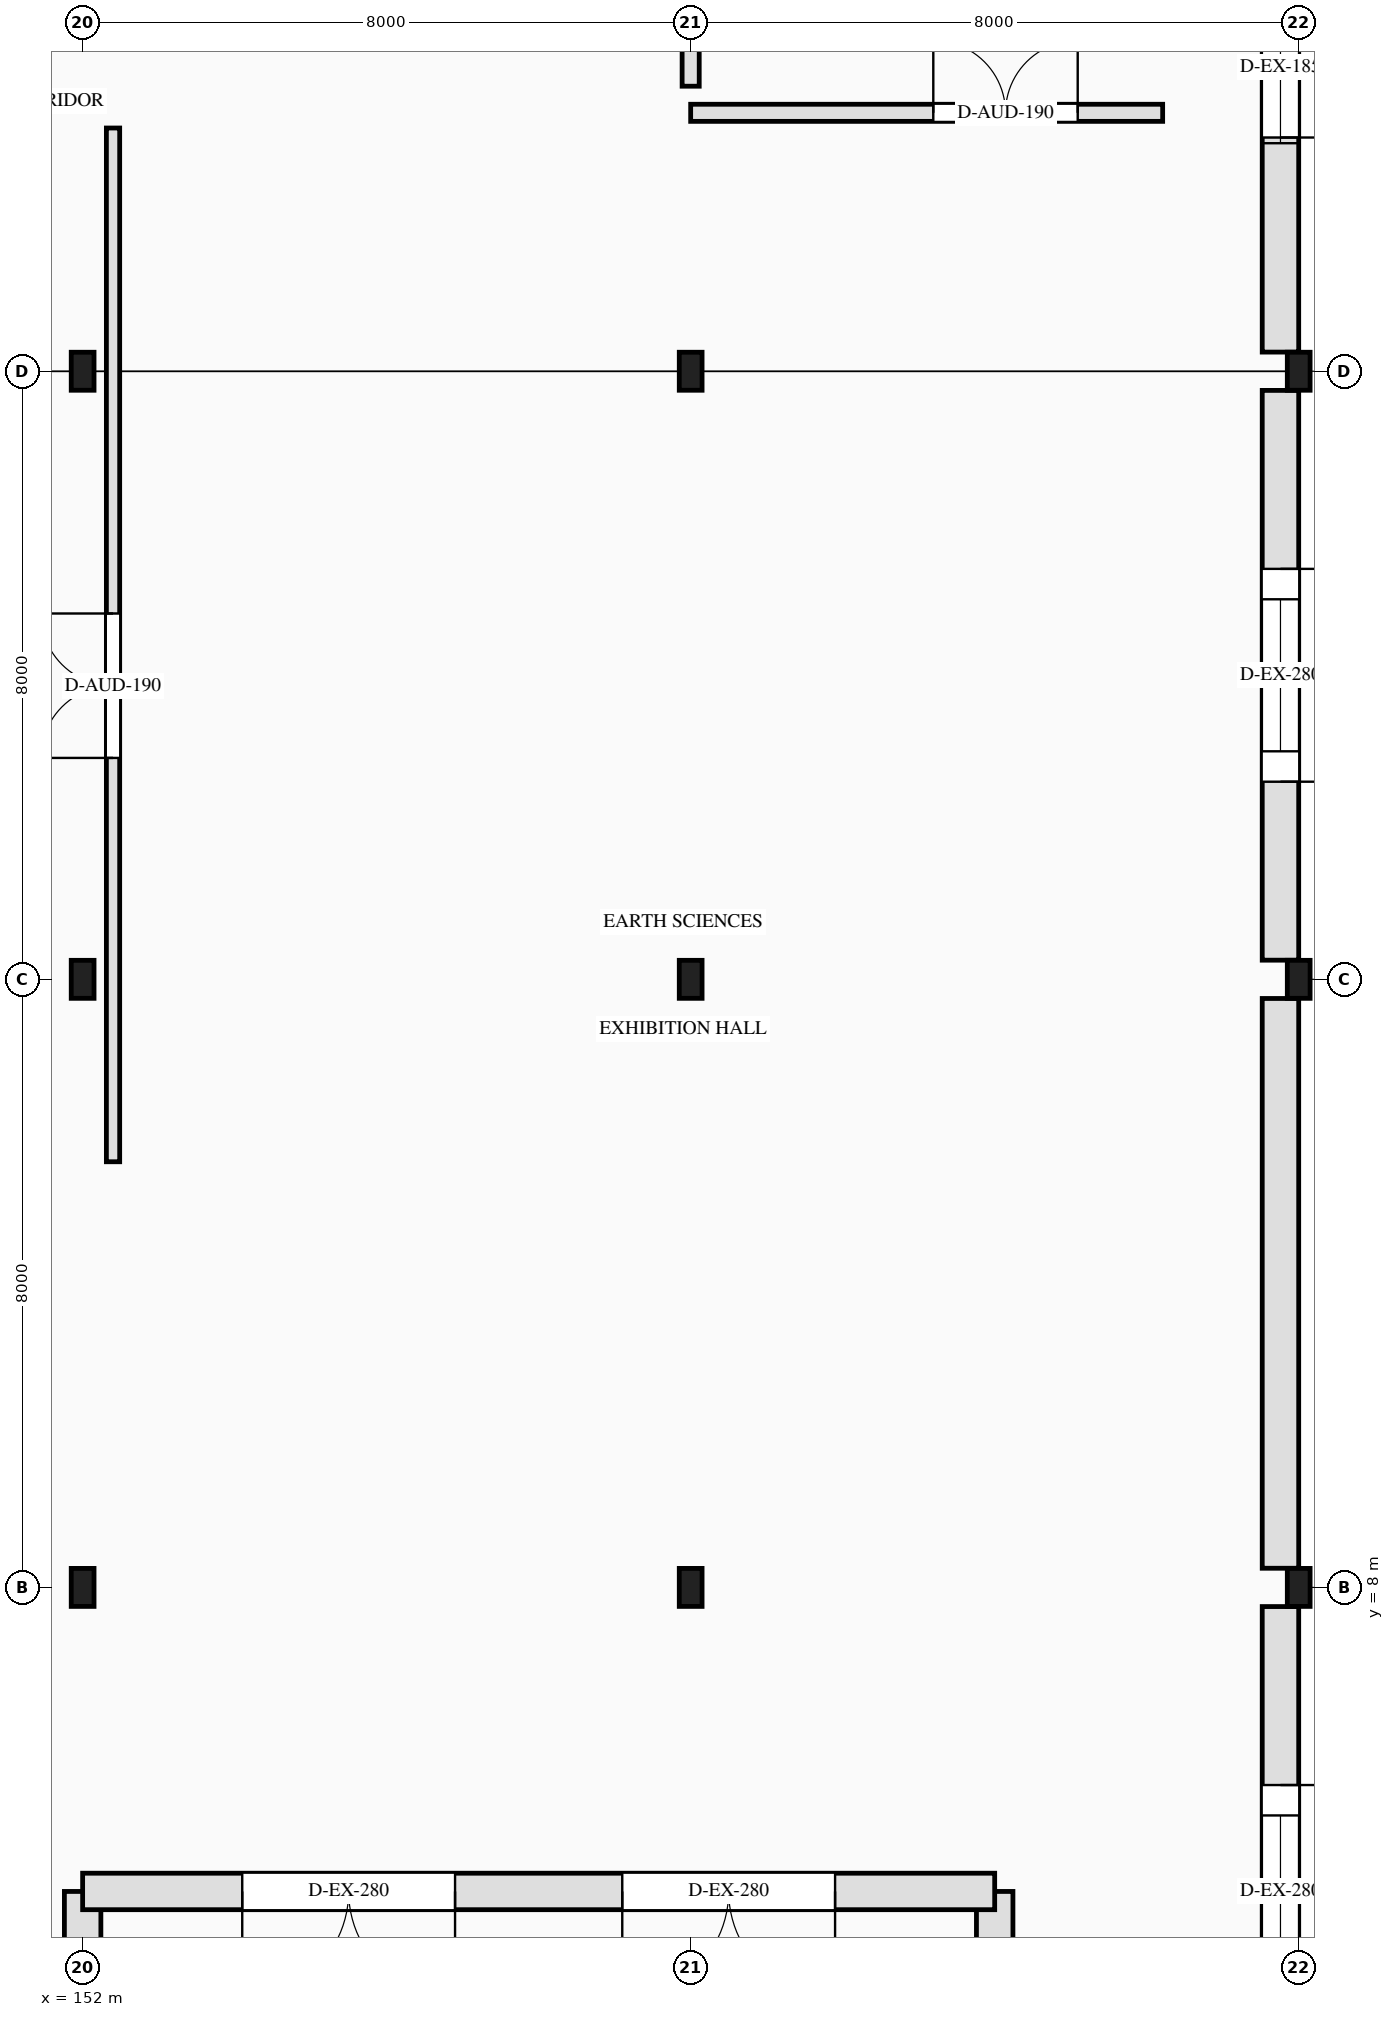
"""IFC4 building model, lengths in metres.
Left out: names, types, materials, properties, quantities, classifications, styles, units other than length and angle.
Written with IfcOpenShell. Run it as: python <this file> out.ifc"""

import sys

from ifc_helpers import new_model, si_unit, direction, frame, frame_2d, origin, origin_2d, place, context, subcontext, project, spatial, rectangle, i_section, extrude, element, fill, save


model = new_model("IFC4")
c1 = context("Model", 3, precision=1e-05, world=origin(), true_north=direction((0.0, 1.0)))
c2 = subcontext(c1, "Body", "Model", "MODEL_VIEW")
j1 = project(units=[si_unit("LENGTHUNIT", "METRE"), si_unit("PLANEANGLEUNIT", "RADIAN")], contexts=[c1])
p1 = place(None, origin())
s1 = spatial("IfcSite", under=j1, at=p1, CompositionType="ELEMENT")
p2 = place(p1, origin())
s2 = spatial("IfcBuilding", under=s1, at=p2, CompositionType="ELEMENT")
p3 = place(p2, origin())
s3 = spatial("IfcBuildingStorey", under=s2, at=p3, CompositionType="ELEMENT", Elevation=0.0)
for number, where, z_axis, x_axis in (
    (1, (152.0, 8.0, 0.0), (0.0, 0.0, 1.0), (1.0, 0.0, 0.0)),
    (2, (152.0, 16.0, 0.0), (0.0, 0.0, 1.0), (1.0, 0.0, 0.0)),
    (3, (152.0, 24.0, 0.0), (0.0, 0.0, 1.0), (1.0, 0.0, 0.0)),
    (4, (160.0, 8.0, 0.0), (0.0, 0.0, 1.0), (1.0, 0.0, 0.0)),
    (5, (160.0, 16.0, 0.0), (0.0, 0.0, 1.0), (1.0, 0.0, 0.0)),
    (6, (160.0, 24.0, 0.0), (0.0, 0.0, 1.0), (1.0, 0.0, 0.0)),
    (7, (168.0, 8.0, 0.0), (0.0, 0.0, 1.0), (1.0, 0.0, 0.0)),
    (8, (168.0, 16.0, 0.0), (0.0, 0.0, 1.0), (1.0, 0.0, 0.0)),
    (9, (168.0, 24.0, 0.0), (0.0, 0.0, 1.0), (1.0, 0.0, 0.0)),
):
    element("IfcColumn", number, at=place(p3, frame(where, z_axis=z_axis, x_axis=x_axis)), inside=s3, PredefinedType="COLUMN", context=c2, shape_type="SweptSolid", body=[
        extrude(i_section(OverallWidth=0.3, OverallDepth=0.5, WebThickness=0.014, FlangeThickness=0.028, FilletRadius=0.027, at=origin_2d()), origin(), (0.0, 0.0, 1.0), 5.4),
    ])
p4 = place(p3, frame((152.0, 0.24, 0.0), z_axis=(0.0, 0.0, 1.0), x_axis=(0.0, 1.0, 0.0)))
e10 = element("IfcWall", 10, at=p4, inside=s3, PredefinedType="SOLIDWALL", context=c2, shape_type="SweptSolid", body=[
    extrude(rectangle(XDim=3.76, YDim=0.48, at=frame_2d((1.88, 0.0))), origin(), (0.0, 0.0, 1.0), 3.84),
])
p5 = place(p4, frame((1.0, 0.0, 0.9)))
e11 = element("IfcOpeningElement", 11, at=p5, cuts=e10, PredefinedType="OPENING", context=c2, shape_type="SweptSolid", body=[
    extrude(rectangle(XDim=1.55, YDim=2.7, at=frame_2d((0.775, 1.35))), frame((0.0, 0.25, 0.0), z_axis=(0.0, -1.0, 0.0), x_axis=(1.0, 0.0, 0.0)), (0.0, 0.0, 1.0), 0.5),
])
p6 = place(p3, frame((164.0, 0.24, 0.0), z_axis=(0.0, 0.0, 1.0), x_axis=(0.0, 1.0, 0.0)))
e12 = element("IfcWall", 12, at=p6, inside=s3, PredefinedType="SOLIDWALL", context=c2, shape_type="SweptSolid", body=[
    extrude(rectangle(XDim=3.76, YDim=0.48, at=frame_2d((1.88, 0.0))), origin(), (0.0, 0.0, 1.0), 3.84),
])
p7 = place(p6, frame((1.0, 0.0, 0.9)))
e13 = element("IfcOpeningElement", 13, at=p7, cuts=e12, PredefinedType="OPENING", context=c2, shape_type="SweptSolid", body=[
    extrude(rectangle(XDim=1.55, YDim=2.7, at=frame_2d((0.775, 1.35))), frame((0.0, 0.25, 0.0), z_axis=(0.0, -1.0, 0.0), x_axis=(1.0, 0.0, 0.0)), (0.0, 0.0, 1.0), 0.5),
])
p8 = place(p3, frame((164.0, 4.0, 0.0), z_axis=(0.0, 0.0, 1.0), x_axis=(-1.0, 0.0, 0.0)))
e14 = element("IfcWall", 14, at=p8, inside=s3, PredefinedType="SOLIDWALL", context=c2, shape_type="SweptSolid", body=[
    extrude(rectangle(XDim=12.0, YDim=0.48, at=frame_2d((6.0, 0.0))), origin(), (0.0, 0.0, 1.0), 5.16),
])
p9 = place(p8, frame((2.1, 0.0, 0.0)))
e15 = element("IfcOpeningElement", 15, at=p9, cuts=e14, PredefinedType="OPENING", context=c2, shape_type="SweptSolid", body=[
    extrude(rectangle(XDim=2.8, YDim=3.1, at=frame_2d((1.4, 1.55))), frame((0.0, 0.25, 0.0), z_axis=(0.0, -1.0, 0.0), x_axis=(1.0, 0.0, 0.0)), (0.0, 0.0, 1.0), 0.5),
])
p10 = place(p8, frame((7.1, 0.0, 0.0)))
e16 = element("IfcOpeningElement", 16, at=p10, cuts=e14, PredefinedType="OPENING", context=c2, shape_type="SweptSolid", body=[
    extrude(rectangle(XDim=2.8, YDim=3.1, at=frame_2d((1.4, 1.55))), frame((0.0, 0.25, 0.0), z_axis=(0.0, -1.0, 0.0), x_axis=(1.0, 0.0, 0.0)), (0.0, 0.0, 1.0), 0.5),
])
p11 = place(p3, frame((167.76, 7.748, 0.0), z_axis=(0.0, 0.0, 1.0), x_axis=(0.0, -1.0, 0.0)))
e17 = element("IfcWall", 17, at=p11, inside=s3, PredefinedType="SOLIDWALL", context=c2, shape_type="SweptSolid", body=[
    extrude(rectangle(XDim=7.496, YDim=0.48, at=frame_2d((3.748, 0.0))), origin(), (0.0, 0.0, 1.0), 4.835),
])
p12 = place(p11, frame((2.348, 0.0, 0.0)))
e18 = element("IfcOpeningElement", 18, at=p12, cuts=e17, PredefinedType="OPENING", context=c2, shape_type="SweptSolid", body=[
    extrude(rectangle(XDim=2.8, YDim=3.1, at=frame_2d((1.4, 1.55))), frame((0.0, 0.25, 0.0), z_axis=(0.0, -1.0, 0.0), x_axis=(1.0, 0.0, 0.0)), (0.0, 0.0, 1.0), 0.5),
])
p13 = place(p11, frame((2.748, 0.0, 3.32)))
e19 = element("IfcOpeningElement", 19, at=p13, cuts=e17, PredefinedType="OPENING", context=c2, shape_type="SweptSolid", body=[
    extrude(rectangle(XDim=2.0, YDim=1.1, at=frame_2d((1.0, 0.55))), frame((0.0, 0.25, 0.0), z_axis=(0.0, -1.0, 0.0), x_axis=(1.0, 0.0, 0.0)), (0.0, 0.0, 1.0), 0.5),
])
p14 = place(p3, frame((167.76, 15.748, 0.0), z_axis=(0.0, 0.0, 1.0), x_axis=(0.0, -1.0, 0.0)))
e20 = element("IfcWall", 20, at=p14, inside=s3, PredefinedType="SOLIDWALL", context=c2, shape_type="SweptSolid", body=[
    extrude(rectangle(XDim=7.496, YDim=0.48, at=frame_2d((3.748, 0.0))), origin(), (0.0, 0.0, 1.0), 4.835),
])
p15 = place(p3, frame((167.76, 23.748, 0.0), z_axis=(0.0, 0.0, 1.0), x_axis=(0.0, -1.0, 0.0)))
e21 = element("IfcWall", 21, at=p15, inside=s3, PredefinedType="SOLIDWALL", context=c2, shape_type="SweptSolid", body=[
    extrude(rectangle(XDim=7.496, YDim=0.48, at=frame_2d((3.748, 0.0))), origin(), (0.0, 0.0, 1.0), 4.835),
])
p16 = place(p15, frame((2.348, 0.0, 0.0)))
e22 = element("IfcOpeningElement", 22, at=p16, cuts=e21, PredefinedType="OPENING", context=c2, shape_type="SweptSolid", body=[
    extrude(rectangle(XDim=2.8, YDim=3.1, at=frame_2d((1.4, 1.55))), frame((0.0, 0.25, 0.0), z_axis=(0.0, -1.0, 0.0), x_axis=(1.0, 0.0, 0.0)), (0.0, 0.0, 1.0), 0.5),
])
p17 = place(p15, frame((2.748, 0.0, 3.32)))
e23 = element("IfcOpeningElement", 23, at=p17, cuts=e21, PredefinedType="OPENING", context=c2, shape_type="SweptSolid", body=[
    extrude(rectangle(XDim=2.0, YDim=1.1, at=frame_2d((1.0, 0.55))), frame((0.0, 0.25, 0.0), z_axis=(0.0, -1.0, 0.0), x_axis=(1.0, 0.0, 0.0)), (0.0, 0.0, 1.0), 0.5),
])
p18 = place(p3, frame((167.76, 31.748, 0.0), z_axis=(0.0, 0.0, 1.0), x_axis=(0.0, -1.0, 0.0)))
e24 = element("IfcWall", 24, at=p18, inside=s3, PredefinedType="SOLIDWALL", context=c2, shape_type="SweptSolid", body=[
    extrude(rectangle(XDim=7.496, YDim=0.48, at=frame_2d((3.748, 0.0))), origin(), (0.0, 0.0, 1.0), 4.835),
])
p19 = place(p18, frame((2.823, 0.0, 0.0)))
e25 = element("IfcOpeningElement", 25, at=p19, cuts=e24, PredefinedType="OPENING", context=c2, shape_type="SweptSolid", body=[
    extrude(rectangle(XDim=1.85, YDim=2.3, at=frame_2d((0.925, 1.15))), frame((0.0, 0.25, 0.0), z_axis=(0.0, -1.0, 0.0), x_axis=(1.0, 0.0, 0.0)), (0.0, 0.0, 1.0), 0.5),
])
p20 = place(p18, frame((2.748, 0.0, 2.52)))
e26 = element("IfcOpeningElement", 26, at=p20, cuts=e24, PredefinedType="OPENING", context=c2, shape_type="SweptSolid", body=[
    extrude(rectangle(XDim=2.0, YDim=1.1, at=frame_2d((1.0, 0.55))), frame((0.0, 0.25, 0.0), z_axis=(0.0, -1.0, 0.0), x_axis=(1.0, 0.0, 0.0)), (0.0, 0.0, 1.0), 0.5),
])
p21 = place(p3, frame((160.0, 27.4, 0.0), z_axis=(0.0, 0.0, 1.0), x_axis=(1.0, 0.0, 0.0)))
e27 = element("IfcWall", 27, at=p21, inside=s3, PredefinedType="SOLIDWALL", context=c2, shape_type="SweptSolid", body=[
    extrude(rectangle(XDim=6.21, YDim=0.225, at=frame_2d((3.105, 0.0))), origin(), (0.0, 0.0, 1.0), 5.16),
])
p22 = place(p21, frame((3.192, 0.0, 0.0)))
e28 = element("IfcOpeningElement", 28, at=p22, cuts=e27, PredefinedType="OPENING", context=c2, shape_type="SweptSolid", body=[
    extrude(rectangle(XDim=1.9, YDim=2.35, at=frame_2d((0.95, 1.175))), frame((0.0, 0.123, 0.0), z_axis=(0.0, -1.0, 0.0), x_axis=(1.0, 0.0, 0.0)), (0.0, 0.0, 1.0), 0.245),
])
p23 = place(p3, frame((152.4, 13.6, 0.0), z_axis=(0.0, 0.0, 1.0), x_axis=(0.0, 1.0, 0.0)))
e29 = element("IfcWall", 29, at=p23, inside=s3, PredefinedType="PARTITIONING", context=c2, shape_type="SweptSolid", body=[
    extrude(rectangle(XDim=13.6, YDim=0.175, at=frame_2d((6.8, 0.0))), origin(), (0.0, 0.0, 1.0), 5.16),
])
p24 = place(p23, frame((5.313, 0.0, 0.0)))
e30 = element("IfcOpeningElement", 30, at=p24, cuts=e29, PredefinedType="OPENING", context=c2, shape_type="SweptSolid", body=[
    extrude(rectangle(XDim=1.9, YDim=2.35, at=frame_2d((0.95, 1.175))), frame((0.0, 0.097, 0.0), z_axis=(0.0, -1.0, 0.0), x_axis=(1.0, 0.0, 0.0)), (0.0, 0.0, 1.0), 0.195),
])
p25 = place(p3, frame((160.0, 27.75, 0.0), z_axis=(0.0, 0.0, 1.0), x_axis=(0.0, 1.0, 0.0)))
e31 = element("IfcWall", 31, at=p25, inside=s3, PredefinedType="SOLIDWALL", context=c2, shape_type="SweptSolid", body=[
    extrude(rectangle(XDim=4.7, YDim=0.225, at=frame_2d((2.35, 0.0))), origin(), (0.0, 0.0, 1.0), 4.72),
])
p26 = place(p9, origin())
e32 = element("IfcDoor", 32, at=p26, inside=s3, OperationType="DOUBLE_DOOR_SINGLE_SWING", PredefinedType="DOOR", context=c2, shape_type="SweptSolid", body=[
    extrude(rectangle(XDim=2.8, YDim=3.1, at=frame_2d((1.4, 1.55))), frame((0.0, 0.025, 0.0), z_axis=(0.0, -1.0, 0.0), x_axis=(1.0, 0.0, 0.0)), (0.0, 0.0, 1.0), 0.05),
])
fill(e15, e32)
p27 = place(p10, origin())
e33 = element("IfcDoor", 33, at=p27, inside=s3, OperationType="DOUBLE_DOOR_SINGLE_SWING", PredefinedType="DOOR", context=c2, shape_type="SweptSolid", body=[
    extrude(rectangle(XDim=2.8, YDim=3.1, at=frame_2d((1.4, 1.55))), frame((0.0, 0.025, 0.0), z_axis=(0.0, -1.0, 0.0), x_axis=(1.0, 0.0, 0.0)), (0.0, 0.0, 1.0), 0.05),
])
fill(e16, e33)
p28 = place(p12, origin())
e34 = element("IfcDoor", 34, at=p28, inside=s3, OperationType="DOUBLE_DOOR_SINGLE_SWING", PredefinedType="DOOR", context=c2, shape_type="SweptSolid", body=[
    extrude(rectangle(XDim=2.8, YDim=3.1, at=frame_2d((1.4, 1.55))), frame((0.0, 0.025, 0.0), z_axis=(0.0, -1.0, 0.0), x_axis=(1.0, 0.0, 0.0)), (0.0, 0.0, 1.0), 0.05),
])
fill(e18, e34)
p29 = place(p13, origin())
e35 = element("IfcWindow", 35, at=p29, inside=s3, PartitioningType="DOUBLE_PANEL_HORIZONTAL", PredefinedType="WINDOW", context=c2, shape_type="SweptSolid", body=[
    extrude(rectangle(XDim=2.0, YDim=1.1, at=frame_2d((1.0, 0.55))), frame((0.0, 0.03, 0.0), z_axis=(0.0, -1.0, 0.0), x_axis=(1.0, 0.0, 0.0)), (0.0, 0.0, 1.0), 0.06),
])
fill(e19, e35)
p30 = place(p16, origin())
e36 = element("IfcDoor", 36, at=p30, inside=s3, OperationType="DOUBLE_DOOR_SINGLE_SWING", PredefinedType="DOOR", context=c2, shape_type="SweptSolid", body=[
    extrude(rectangle(XDim=2.8, YDim=3.1, at=frame_2d((1.4, 1.55))), frame((0.0, 0.025, 0.0), z_axis=(0.0, -1.0, 0.0), x_axis=(1.0, 0.0, 0.0)), (0.0, 0.0, 1.0), 0.05),
])
fill(e22, e36)
p31 = place(p17, origin())
e37 = element("IfcWindow", 37, at=p31, inside=s3, PartitioningType="DOUBLE_PANEL_HORIZONTAL", PredefinedType="WINDOW", context=c2, shape_type="SweptSolid", body=[
    extrude(rectangle(XDim=2.0, YDim=1.1, at=frame_2d((1.0, 0.55))), frame((0.0, 0.03, 0.0), z_axis=(0.0, -1.0, 0.0), x_axis=(1.0, 0.0, 0.0)), (0.0, 0.0, 1.0), 0.06),
])
fill(e23, e37)
p32 = place(p19, origin())
e38 = element("IfcDoor", 38, at=p32, inside=s3, OperationType="DOUBLE_DOOR_SINGLE_SWING", PredefinedType="DOOR", context=c2, shape_type="SweptSolid", body=[
    extrude(rectangle(XDim=1.85, YDim=2.3, at=frame_2d((0.925, 1.15))), frame((0.0, 0.025, 0.0), z_axis=(0.0, -1.0, 0.0), x_axis=(1.0, 0.0, 0.0)), (0.0, 0.0, 1.0), 0.05),
])
fill(e25, e38)
p33 = place(p20, origin())
e39 = element("IfcWindow", 39, at=p33, inside=s3, PartitioningType="DOUBLE_PANEL_HORIZONTAL", PredefinedType="WINDOW", context=c2, shape_type="SweptSolid", body=[
    extrude(rectangle(XDim=2.0, YDim=1.1, at=frame_2d((1.0, 0.55))), frame((0.0, 0.03, 0.0), z_axis=(0.0, -1.0, 0.0), x_axis=(1.0, 0.0, 0.0)), (0.0, 0.0, 1.0), 0.06),
])
fill(e26, e39)
p34 = place(p22, origin())
e40 = element("IfcDoor", 40, at=p34, inside=s3, OperationType="DOUBLE_DOOR_SINGLE_SWING", PredefinedType="DOOR", context=c2, shape_type="SweptSolid", body=[
    extrude(rectangle(XDim=1.9, YDim=2.35, at=frame_2d((0.95, 1.175))), frame((0.0, 0.025, 0.0), z_axis=(0.0, -1.0, 0.0), x_axis=(1.0, 0.0, 0.0)), (0.0, 0.0, 1.0), 0.05),
])
fill(e28, e40)
p35 = place(p24, origin())
e41 = element("IfcDoor", 41, at=p35, inside=s3, OperationType="DOUBLE_DOOR_SINGLE_SWING", PredefinedType="DOOR", context=c2, shape_type="SweptSolid", body=[
    extrude(rectangle(XDim=1.9, YDim=2.35, at=frame_2d((0.95, 1.175))), frame((0.0, 0.025, 0.0), z_axis=(0.0, -1.0, 0.0), x_axis=(1.0, 0.0, 0.0)), (0.0, 0.0, 1.0), 0.05),
])
fill(e30, e41)
save(model, sys.argv[1])
